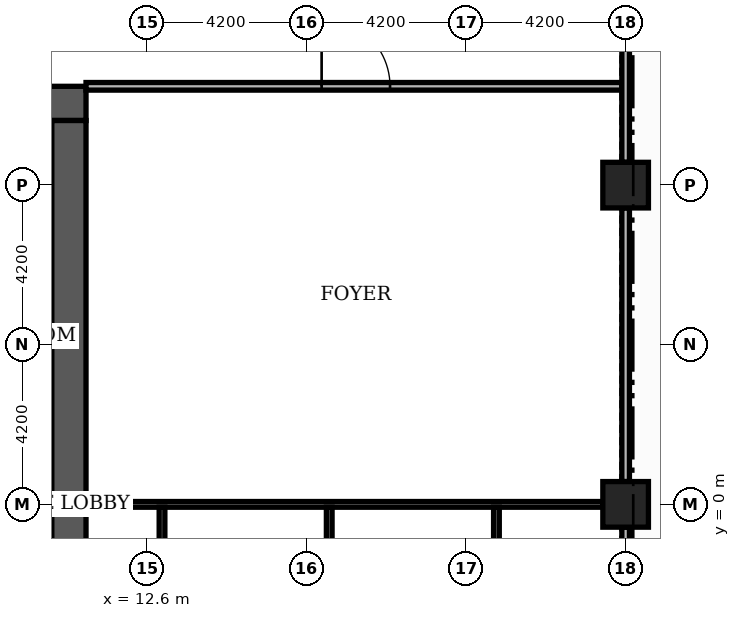
"""IFC4 building model, lengths in metres.
Left out: names, types, materials, properties, quantities, classifications, styles, units other than length and angle.
Written with IfcOpenShell. Run it as: python <this file> out.ifc"""

import sys

from ifc_helpers import new_model, si_unit, direction, frame, frame_2d, origin, origin_2d, place, context, subcontext, project, spatial, rectangle, extrude, element, fill, save


model = new_model("IFC4")
c1 = context("Model", 3, precision=1e-05, world=origin(), true_north=direction((0.0, 1.0)))
c2 = subcontext(c1, "Body", "Model", "MODEL_VIEW")
j1 = project(units=[si_unit("LENGTHUNIT", "METRE"), si_unit("PLANEANGLEUNIT", "RADIAN")], contexts=[c1])
p1 = place(None, origin())
s1 = spatial("IfcSite", under=j1, at=p1, CompositionType="ELEMENT")
p2 = place(p1, origin())
s2 = spatial("IfcBuilding", under=s1, at=p2, CompositionType="ELEMENT")
p3 = place(p2, frame((0.0, 0.0, 16.8)))
s3 = spatial("IfcBuildingStorey", under=s2, at=p3, CompositionType="ELEMENT", Elevation=16.8)
p4 = place(p3, frame((9.2, 2.4, 0.0), z_axis=(0.0, 0.0, 1.0), x_axis=(1.0, 0.0, 0.0)))
e1 = element("IfcWall", 1, at=p4, inside=s3, PredefinedType="SHEAR", context=c2, shape_type="SweptSolid", body=[
    extrude(rectangle(XDim=0.9, YDim=0.2, at=frame_2d((0.45, 0.0))), origin(), (0.0, 0.0, 1.0), 4.98),
])
p5 = place(p3, frame((-11.0, 10.55, 0.0), z_axis=(0.0, 0.0, 1.0), x_axis=(1.0, 0.0, 0.0)))
e2 = element("IfcWall", 2, at=p5, inside=s3, PredefinedType="SHEAR", context=c2, shape_type="SweptSolid", body=[
    extrude(rectangle(XDim=22.0, YDim=0.9, at=frame_2d((11.0, 0.0))), origin(), (0.0, 0.0, 1.0), 4.98),
])
p6 = place(p5, frame((13.3, 0.0, 0.0)))
e3 = element("IfcOpeningElement", 3, at=p6, cuts=e2, PredefinedType="OPENING", context=c2, shape_type="SweptSolid", body=[
    extrude(rectangle(XDim=1.8, YDim=2.2, at=frame_2d((0.9, 1.1))), frame((0.0, 0.46, 0.0), z_axis=(0.0, -1.0, 0.0), x_axis=(1.0, 0.0, 0.0)), (0.0, 0.0, 1.0), 0.92),
])
p7 = place(p3, frame((10.55, -10.1, 0.0), z_axis=(0.0, 0.0, 1.0), x_axis=(0.0, 1.0, 0.0)))
e4 = element("IfcWall", 4, at=p7, inside=s3, PredefinedType="SHEAR", context=c2, shape_type="SweptSolid", body=[
    extrude(rectangle(XDim=20.2, YDim=0.9, at=frame_2d((10.1, 0.0))), origin(), (0.0, 0.0, 1.0), 4.98),
])
for number, where, z_axis, x_axis in (
    (5, (25.2, 0.0, 0.0), (0.0, 0.0, 1.0), (1.0, 0.0, 0.0)),
    (6, (25.2, 8.4, 0.0), (0.0, 0.0, 1.0), (1.0, 0.0, 0.0)),
):
    element("IfcColumn", number, at=place(p3, frame(where, z_axis=z_axis, x_axis=x_axis)), inside=s3, PredefinedType="COLUMN", context=c2, shape_type="SweptSolid", body=[
        extrude(rectangle(XDim=1.2, YDim=1.2, at=origin_2d()), origin(), (0.0, 0.0, 1.0), 5.4),
    ])
p8 = place(p3, frame((11.0, 0.0, 0.0), z_axis=(0.0, 0.0, 1.0), x_axis=(1.0, 0.0, 0.0)))
e7 = element("IfcWall", 7, at=p8, inside=s3, PredefinedType="PARTITIONING", context=c2, shape_type="SweptSolid", body=[
    extrude(rectangle(XDim=13.6, YDim=0.15, at=frame_2d((6.8, 0.0))), origin(), (0.0, 0.0, 1.0), 4.98),
])
p9 = place(p3, frame((11.0, 11.0, 0.0), z_axis=(0.0, 0.0, 1.0), x_axis=(1.0, 0.0, 0.0)))
e8 = element("IfcWall", 8, at=p9, inside=s3, PredefinedType="PARTITIONING", context=c2, shape_type="SweptSolid", body=[
    extrude(rectangle(XDim=14.1, YDim=0.2, at=frame_2d((7.05, 0.0))), origin(), (0.0, 0.0, 1.0), 4.98),
])
p10 = place(p9, frame((6.2, 0.0, 0.0)))
e9 = element("IfcOpeningElement", 9, at=p10, cuts=e8, PredefinedType="OPENING", context=c2, shape_type="SweptSolid", body=[
    extrude(rectangle(XDim=1.8, YDim=2.2, at=frame_2d((0.9, 1.1))), frame((0.0, 0.11, 0.0), z_axis=(0.0, -1.0, 0.0), x_axis=(1.0, 0.0, 0.0)), (0.0, 0.0, 1.0), 0.22),
])
for number, where, z_axis, x_axis in (
    (10, (13.0, -8.325, 0.0), (0.0, 0.0, 1.0), (0.0, 1.0, 0.0)),
    (11, (17.4, -8.325, 0.0), (0.0, 0.0, 1.0), (0.0, 1.0, 0.0)),
    (12, (21.8, -8.325, 0.0), (0.0, 0.0, 1.0), (0.0, 1.0, 0.0)),
):
    element("IfcWall", number, at=place(p3, frame(where, z_axis=z_axis, x_axis=x_axis)), inside=s3, PredefinedType="PARTITIONING", context=c2, shape_type="SweptSolid", body=[
        extrude(rectangle(XDim=8.25, YDim=0.15, at=frame_2d((4.125, 0.0))), origin(), (0.0, 0.0, 1.0), 4.98),
    ])
for number, where, z_axis, x_axis in (
    (13, (25.2, -7.8, 0.0), (0.0, 0.0, 1.0), (0.0, 1.0, 0.0)),
    (14, (25.2, 0.6, 0.0), (0.0, 0.0, 1.0), (0.0, 1.0, 0.0)),
):
    element("IfcWall", number, at=place(p3, frame(where, z_axis=z_axis, x_axis=x_axis)), inside=s3, PredefinedType="PARTITIONING", context=c2, shape_type="SweptSolid", body=[
        extrude(rectangle(XDim=7.2, YDim=0.2, at=frame_2d((3.6, 0.0))), origin(), (0.0, 0.0, 1.0), 4.68),
    ])
p11 = place(p3, frame((25.2, 9.0, 0.0), z_axis=(0.0, 0.0, 1.0), x_axis=(0.0, 1.0, 0.0)))
e15 = element("IfcWall", 15, at=p11, inside=s3, PredefinedType="PARTITIONING", context=c2, shape_type="SweptSolid", body=[
    extrude(rectangle(XDim=7.2, YDim=0.2, at=frame_2d((3.6, 0.0))), origin(), (0.0, 0.0, 1.0), 4.68),
])
p12 = place(p11, frame((3.9, 0.0, 0.0)))
e16 = element("IfcOpeningElement", 16, at=p12, cuts=e15, PredefinedType="OPENING", context=c2, shape_type="SweptSolid", body=[
    extrude(rectangle(XDim=1.8, YDim=2.2, at=frame_2d((0.9, 1.1))), frame((0.0, 0.11, 0.0), z_axis=(0.0, -1.0, 0.0), x_axis=(1.0, 0.0, 0.0)), (0.0, 0.0, 1.0), 0.22),
])
p13 = place(p10, origin())
e17 = element("IfcDoor", 17, at=p13, inside=s3, OperationType="DOUBLE_DOOR_SINGLE_SWING", PredefinedType="DOOR", context=c2, shape_type="SweptSolid", body=[
    extrude(rectangle(XDim=1.8, YDim=2.2, at=frame_2d((0.9, 1.1))), frame((0.0, 0.025, 0.0), z_axis=(0.0, -1.0, 0.0), x_axis=(1.0, 0.0, 0.0)), (0.0, 0.0, 1.0), 0.05),
])
fill(e9, e17)
save(model, sys.argv[1])
